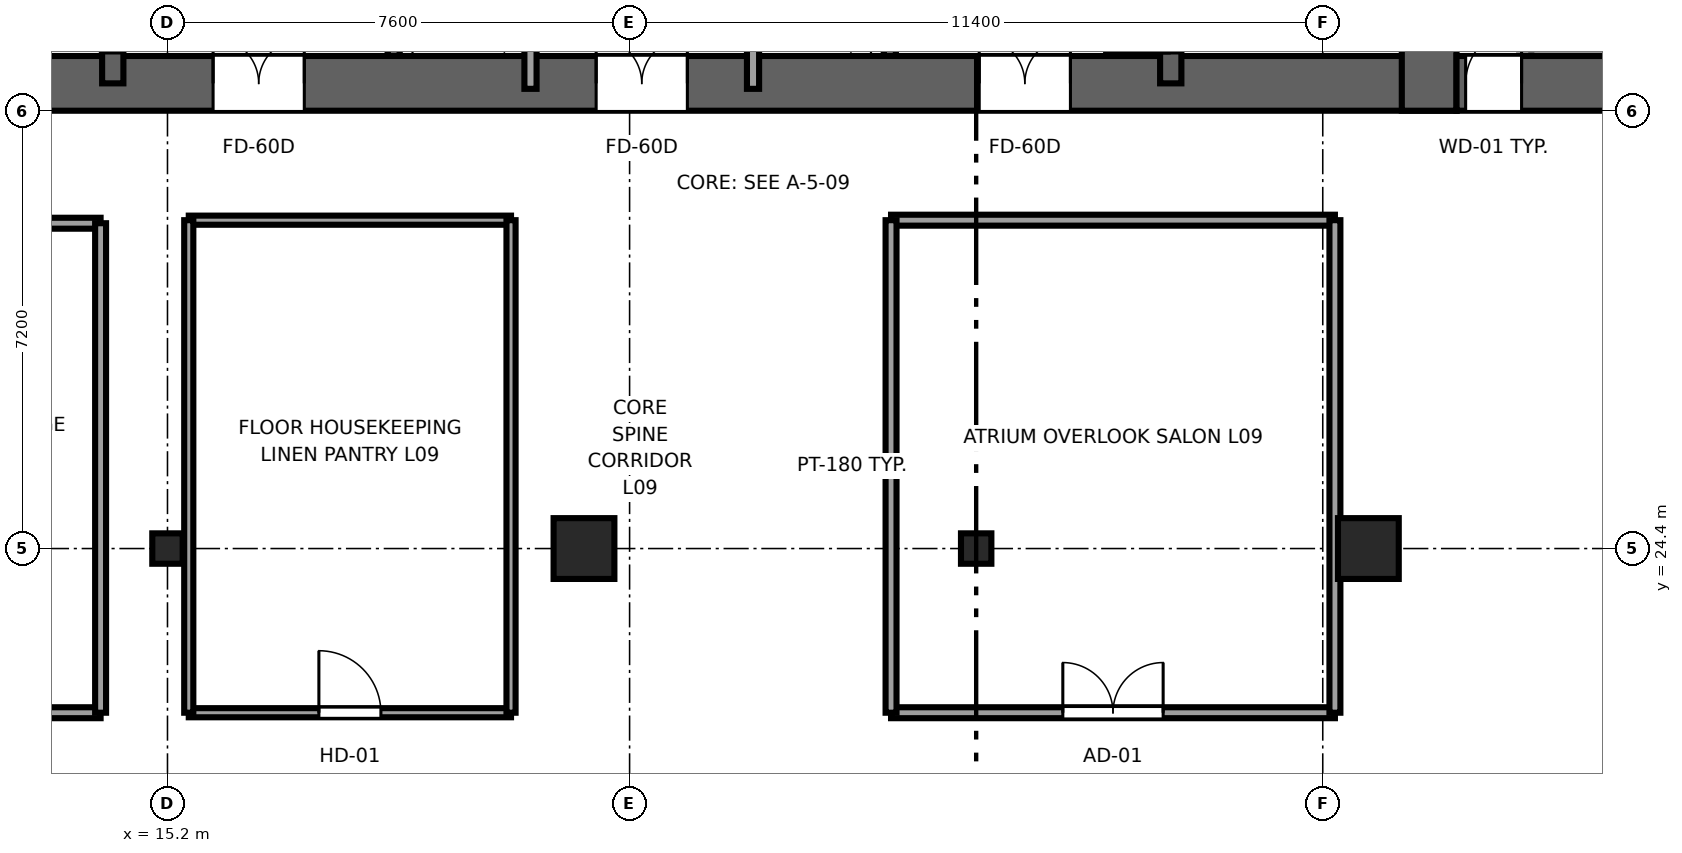
"""IFC4 building model, lengths in metres.
Left out: names, types, materials, properties, quantities, classifications, styles, units other than length and angle.
Written with IfcOpenShell. Run it as: python <this file> out.ifc"""

import sys

from ifc_helpers import new_model, si_unit, direction, frame, frame_2d, origin, origin_2d, place, context, subcontext, project, spatial, rectangle, i_section, extrude, source, transform, mapped, element, fill, save


model = new_model("IFC4")
c1 = context("Model", 3, precision=1e-05, world=origin(), true_north=direction((0.0, 1.0)))
c2 = subcontext(c1, "Body", "Model", "MODEL_VIEW")
j1 = project(units=[si_unit("LENGTHUNIT", "METRE"), si_unit("PLANEANGLEUNIT", "RADIAN")], contexts=[c1])
p1 = place(None, origin())
s1 = spatial("IfcSite", under=j1, at=p1, CompositionType="ELEMENT")
p2 = place(p1, origin())
s2 = spatial("IfcBuilding", under=s1, at=p2, CompositionType="ELEMENT")
p3 = place(p2, frame((0.0, 0.0, 42.65)))
s3 = spatial("IfcBuildingStorey", under=s2, at=p3, CompositionType="ELEMENT", Elevation=42.65)
p4 = place(p3, frame((9.6, 32.05, 0.0), z_axis=(0.0, 0.0, 1.0), x_axis=(1.0, 0.0, 0.0)))
e1 = element("IfcWall", 1, at=p4, inside=s3, PredefinedType="SHEAR", context=c2, shape_type="SweptSolid", body=[
    extrude(rectangle(XDim=26.8, YDim=0.9, at=frame_2d((13.4, 0.0))), origin(), (0.0, 0.0, 1.0), 3.55),
])
p5 = place(p4, frame((7.85, 0.0, 0.0), z_axis=(0.0, 0.0, 1.0), x_axis=(-1.0, 0.0, 0.0)))
e2 = element("IfcOpeningElement", 2, at=p5, cuts=e1, PredefinedType="OPENING", context=c2, shape_type="SweptSolid", body=[
    extrude(rectangle(XDim=1.5, YDim=2.04, at=frame_2d((0.75, 1.02))), frame((0.0, 0.46, 0.0), z_axis=(0.0, -1.0, 0.0), x_axis=(1.0, 0.0, 0.0)), (0.0, 0.0, 1.0), 0.92),
])
p6 = place(p4, frame((14.15, 0.0, 0.0), z_axis=(0.0, 0.0, 1.0), x_axis=(-1.0, 0.0, 0.0)))
e3 = element("IfcOpeningElement", 3, at=p6, cuts=e1, PredefinedType="OPENING", context=c2, shape_type="SweptSolid", body=[
    extrude(rectangle(XDim=1.5, YDim=2.04, at=frame_2d((0.75, 1.02))), frame((0.0, 0.46, 0.0), z_axis=(0.0, -1.0, 0.0), x_axis=(1.0, 0.0, 0.0)), (0.0, 0.0, 1.0), 0.92),
])
p7 = place(p4, frame((20.45, 0.0, 0.0), z_axis=(0.0, 0.0, 1.0), x_axis=(-1.0, 0.0, 0.0)))
e4 = element("IfcOpeningElement", 4, at=p7, cuts=e1, PredefinedType="OPENING", context=c2, shape_type="SweptSolid", body=[
    extrude(rectangle(XDim=1.5, YDim=2.04, at=frame_2d((0.75, 1.02))), frame((0.0, 0.46, 0.0), z_axis=(0.0, -1.0, 0.0), x_axis=(1.0, 0.0, 0.0)), (0.0, 0.0, 1.0), 0.92),
])
p8 = place(p3, frame((35.95, 31.6, 0.0), z_axis=(0.0, 0.0, 1.0), x_axis=(0.0, 1.0, 0.0)))
e5 = element("IfcWall", 5, at=p8, inside=s3, PredefinedType="SHEAR", context=c2, shape_type="SweptSolid", body=[
    extrude(rectangle(XDim=13.6, YDim=0.9, at=frame_2d((6.8, 0.0))), origin(), (0.0, 0.0, 1.0), 3.55),
])
p9 = place(p3, frame((14.3, 32.05, 0.0), z_axis=(0.0, 0.0, 1.0), x_axis=(0.0, 1.0, 0.0)))
e6 = element("IfcWall", 6, at=p9, inside=s3, PredefinedType="SHEAR", context=c2, shape_type="SweptSolid", body=[
    extrude(rectangle(XDim=12.7, YDim=0.35, at=frame_2d((6.35, 0.0))), origin(), (0.0, 0.0, 1.0), 3.55),
])
p10 = place(p9, frame((0.5, 0.0, 0.0)))
e7 = element("IfcOpeningElement", 7, at=p10, cuts=e6, PredefinedType="OPENING", context=c2, shape_type="SweptSolid", body=[
    extrude(rectangle(XDim=1.1, YDim=2.12, at=frame_2d((0.55, 1.06))), frame((0.0, 0.185, 0.0), z_axis=(0.0, -1.0, 0.0), x_axis=(1.0, 0.0, 0.0)), (0.0, 0.0, 1.0), 0.37),
])
p11 = place(p3, frame((31.7, 32.05, 0.0), z_axis=(0.0, 0.0, 1.0), x_axis=(0.0, 1.0, 0.0)))
e8 = element("IfcWall", 8, at=p11, inside=s3, PredefinedType="SHEAR", context=c2, shape_type="SweptSolid", body=[
    extrude(rectangle(XDim=12.7, YDim=0.35, at=frame_2d((6.35, 0.0))), origin(), (0.0, 0.0, 1.0), 3.55),
])
p12 = place(p11, frame((1.6, 0.0, 0.0), z_axis=(0.0, 0.0, 1.0), x_axis=(-1.0, 0.0, 0.0)))
e9 = element("IfcOpeningElement", 9, at=p12, cuts=e8, PredefinedType="OPENING", context=c2, shape_type="SweptSolid", body=[
    extrude(rectangle(XDim=1.1, YDim=2.12, at=frame_2d((0.55, 1.06))), frame((0.0, 0.185, 0.0), z_axis=(0.0, -1.0, 0.0), x_axis=(1.0, 0.0, 0.0)), (0.0, 0.0, 1.0), 0.37),
])
p13 = place(p3, frame((36.4, 32.05, 0.0), z_axis=(0.0, 0.0, 1.0), x_axis=(1.0, 0.0, 0.0)))
e10 = element("IfcWall", 10, at=p13, inside=s3, PredefinedType="SHEAR", context=c2, shape_type="SweptSolid", body=[
    extrude(rectangle(XDim=4.0, YDim=0.9, at=frame_2d((2.0, 0.0))), origin(), (0.0, 0.0, 1.0), 3.55),
])
p14 = place(p13, frame((1.07, 0.0, 0.0), z_axis=(0.0, 0.0, 1.0), x_axis=(-1.0, 0.0, 0.0)))
e11 = element("IfcOpeningElement", 11, at=p14, cuts=e10, PredefinedType="OPENING", context=c2, shape_type="SweptSolid", body=[
    extrude(rectangle(XDim=0.92, YDim=2.01, at=frame_2d((0.46, 1.005))), frame((0.0, 0.46, 0.0), z_axis=(0.0, -1.0, 0.0), x_axis=(1.0, 0.0, 0.0)), (0.0, 0.0, 1.0), 0.92),
])
m1 = source(origin(), c2, "Body", "SweptSolid", [
    extrude(i_section(OverallWidth=0.5, OverallDepth=0.5, WebThickness=0.028, FlangeThickness=0.045, at=origin_2d()), origin(), (0.0, 0.0, 1.0), 3.55),
])
p15 = place(p3, frame((15.2, 24.4, 0.0), z_axis=(0.0, 0.0, 1.0), x_axis=(1.0, 0.0, 0.0)))
e12 = element("IfcColumn", 12, at=p15, inside=s3, PredefinedType="COLUMN", context=c2, shape_type="MappedRepresentation", body=[
    mapped(m1, transform((0.0, 0.0, 0.0), x_axis=(1.0, 0.0, 0.0), y_axis=(0.0, 1.0, 0.0), z_axis=(0.0, 0.0, 1.0), scale=1.0)),
])
m2 = source(origin(), c2, "Body", "SweptSolid", [
    extrude(rectangle(XDim=1.0, YDim=1.0, at=origin_2d()), origin(), (0.0, 0.0, 1.0), 3.55),
])
for number, where, z_axis, x_axis in (
    (13, (22.05, 24.4, 0.0), (0.0, 0.0, 1.0), (1.0, 0.0, 0.0)),
    (14, (34.95, 24.4, 0.0), (0.0, 0.0, 1.0), (1.0, 0.0, 0.0)),
):
    element("IfcColumn", number, at=place(p3, frame(where, z_axis=z_axis, x_axis=x_axis)), inside=s3, PredefinedType="COLUMN", context=c2, shape_type="MappedRepresentation", body=[
        mapped(m2, transform((0.0, 0.0, 0.0), x_axis=(1.0, 0.0, 0.0), y_axis=(0.0, 1.0, 0.0), z_axis=(0.0, 0.0, 1.0), scale=1.0)),
    ])
p16 = place(p3, frame((28.5, 24.4, 0.0), z_axis=(0.0, 0.0, 1.0), x_axis=(1.0, 0.0, 0.0)))
e15 = element("IfcColumn", 15, at=p16, inside=s3, PredefinedType="COLUMN", context=c2, shape_type="MappedRepresentation", body=[
    mapped(m1, transform((0.0, 0.0, 0.0), x_axis=(1.0, 0.0, 0.0), y_axis=(0.0, 1.0, 0.0), z_axis=(0.0, 0.0, 1.0), scale=1.0)),
])
for number, where, z_axis, x_axis in (
    (16, (18.92, 32.504, 0.0), (0.0, 0.0, 1.0), (0.0, 1.0, 0.0)),
    (17, (27.08, 32.504, 0.0), (0.0, 0.0, 1.0), (0.0, 1.0, 0.0)),
):
    element("IfcWall", number, at=place(p3, frame(where, z_axis=z_axis, x_axis=x_axis)), inside=s3, PredefinedType="SOLIDWALL", context=c2, shape_type="SweptSolid", body=[
        extrude(rectangle(XDim=3.646, YDim=0.2, at=frame_2d((1.823, 0.0))), origin(), (0.0, 0.0, 1.0), 3.37),
    ])
for number, where, z_axis, x_axis in (
    (18, (21.17, 31.96, 0.0), (0.0, 0.0, 1.0), (0.0, 1.0, 0.0)),
    (19, (24.83, 31.96, 0.0), (0.0, 0.0, 1.0), (0.0, 1.0, 0.0)),
):
    element("IfcWall", number, at=place(p3, frame(where, z_axis=z_axis, x_axis=x_axis)), inside=s3, PredefinedType="SOLIDWALL", context=c2, shape_type="SweptSolid", body=[
        extrude(rectangle(XDim=12.58, YDim=0.2, at=frame_2d((6.29, 0.0))), origin(), (0.0, 0.0, 1.0), 3.37),
    ])
p17 = place(p3, frame((9.88, 21.7, 0.0), z_axis=(0.0, 0.0, 1.0), x_axis=(1.0, 0.0, 0.0)))
e20 = element("IfcWall", 20, at=p17, inside=s3, PredefinedType="PARTITIONING", context=c2, shape_type="SweptSolid", body=[
    extrude(rectangle(XDim=4.22, YDim=0.18, at=frame_2d((2.11, 0.0))), origin(), (0.0, 0.0, 1.0), 3.37),
])
p18 = place(p17, frame((1.285, 0.0, 0.0)))
e21 = element("IfcOpeningElement", 21, at=p18, cuts=e20, PredefinedType="OPENING", context=c2, shape_type="SweptSolid", body=[
    extrude(rectangle(XDim=1.65, YDim=2.15, at=frame_2d((0.825, 1.075))), frame((0.0, 0.1, 0.0), z_axis=(0.0, -1.0, 0.0), x_axis=(1.0, 0.0, 0.0)), (0.0, 0.0, 1.0), 0.2),
])
p19 = place(p3, frame((9.88, 29.75, 0.0), z_axis=(0.0, 0.0, 1.0), x_axis=(1.0, 0.0, 0.0)))
e22 = element("IfcWall", 22, at=p19, inside=s3, PredefinedType="PARTITIONING", context=c2, shape_type="SweptSolid", body=[
    extrude(rectangle(XDim=4.22, YDim=0.18, at=frame_2d((2.11, 0.0))), origin(), (0.0, 0.0, 1.0), 3.37),
])
p20 = place(p3, frame((14.1, 21.7, 0.0), z_axis=(0.0, 0.0, 1.0), x_axis=(0.0, 1.0, 0.0)))
e23 = element("IfcWall", 23, at=p20, inside=s3, PredefinedType="PARTITIONING", context=c2, shape_type="SweptSolid", body=[
    extrude(rectangle(XDim=8.05, YDim=0.18, at=frame_2d((4.025, 0.0))), origin(), (0.0, 0.0, 1.0), 3.37),
])
p21 = place(p3, frame((27.1, 21.7, 0.0), z_axis=(0.0, 0.0, 1.0), x_axis=(1.0, 0.0, 0.0)))
e24 = element("IfcWall", 24, at=p21, inside=s3, PredefinedType="PARTITIONING", context=c2, shape_type="SweptSolid", body=[
    extrude(rectangle(XDim=7.3, YDim=0.18, at=frame_2d((3.65, 0.0))), origin(), (0.0, 0.0, 1.0), 3.37),
])
p22 = place(p21, frame((2.825, 0.0, 0.0)))
e25 = element("IfcOpeningElement", 25, at=p22, cuts=e24, PredefinedType="OPENING", context=c2, shape_type="SweptSolid", body=[
    extrude(rectangle(XDim=1.65, YDim=2.15, at=frame_2d((0.825, 1.075))), frame((0.0, 0.1, 0.0), z_axis=(0.0, -1.0, 0.0), x_axis=(1.0, 0.0, 0.0)), (0.0, 0.0, 1.0), 0.2),
])
p23 = place(p3, frame((27.1, 29.8, 0.0), z_axis=(0.0, 0.0, 1.0), x_axis=(1.0, 0.0, 0.0)))
e26 = element("IfcWall", 26, at=p23, inside=s3, PredefinedType="PARTITIONING", context=c2, shape_type="SweptSolid", body=[
    extrude(rectangle(XDim=7.3, YDim=0.18, at=frame_2d((3.65, 0.0))), origin(), (0.0, 0.0, 1.0), 3.37),
])
for number, where, z_axis, x_axis in (
    (27, (27.1, 21.7, 0.0), (0.0, 0.0, 1.0), (0.0, 1.0, 0.0)),
    (28, (34.4, 21.7, 0.0), (0.0, 0.0, 1.0), (0.0, 1.0, 0.0)),
):
    element("IfcWall", number, at=place(p3, frame(where, z_axis=z_axis, x_axis=x_axis)), inside=s3, PredefinedType="PARTITIONING", context=c2, shape_type="SweptSolid", body=[
        extrude(rectangle(XDim=8.1, YDim=0.18, at=frame_2d((4.05, 0.0))), origin(), (0.0, 0.0, 1.0), 3.37),
    ])
p24 = place(p3, frame((15.55, 21.7, 0.0), z_axis=(0.0, 0.0, 1.0), x_axis=(1.0, 0.0, 0.0)))
e29 = element("IfcWall", 29, at=p24, inside=s3, PredefinedType="PARTITIONING", context=c2, shape_type="SweptSolid", body=[
    extrude(rectangle(XDim=5.3, YDim=0.15, at=frame_2d((2.65, 0.0))), origin(), (0.0, 0.0, 1.0), 3.37),
])
p25 = place(p24, frame((2.14, 0.0, 0.0)))
e30 = element("IfcOpeningElement", 30, at=p25, cuts=e29, PredefinedType="OPENING", context=c2, shape_type="SweptSolid", body=[
    extrude(rectangle(XDim=1.02, YDim=2.03, at=frame_2d((0.51, 1.015))), frame((0.0, 0.085, 0.0), z_axis=(0.0, -1.0, 0.0), x_axis=(1.0, 0.0, 0.0)), (0.0, 0.0, 1.0), 0.17),
])
p26 = place(p3, frame((15.55, 29.8, 0.0), z_axis=(0.0, 0.0, 1.0), x_axis=(1.0, 0.0, 0.0)))
e31 = element("IfcWall", 31, at=p26, inside=s3, PredefinedType="PARTITIONING", context=c2, shape_type="SweptSolid", body=[
    extrude(rectangle(XDim=5.3, YDim=0.15, at=frame_2d((2.65, 0.0))), origin(), (0.0, 0.0, 1.0), 3.37),
])
for number, where, z_axis, x_axis in (
    (32, (15.55, 21.7, 0.0), (0.0, 0.0, 1.0), (0.0, 1.0, 0.0)),
    (33, (20.85, 21.7, 0.0), (0.0, 0.0, 1.0), (0.0, 1.0, 0.0)),
):
    element("IfcWall", number, at=place(p3, frame(where, z_axis=z_axis, x_axis=x_axis)), inside=s3, PredefinedType="PARTITIONING", context=c2, shape_type="SweptSolid", body=[
        extrude(rectangle(XDim=8.1, YDim=0.15, at=frame_2d((4.05, 0.0))), origin(), (0.0, 0.0, 1.0), 3.37),
    ])
m3 = source(origin(), c2, "Body", "SweptSolid", [
    extrude(rectangle(XDim=1.1, YDim=2.12, at=frame_2d((0.55, 1.06))), frame((0.0, 0.025, 0.0), z_axis=(0.0, -1.0, 0.0), x_axis=(1.0, 0.0, 0.0)), (0.0, 0.0, 1.0), 0.05),
])
p27 = place(p10, origin())
e34 = element("IfcDoor", 34, at=p27, inside=s3, OperationType="SINGLE_SWING_RIGHT", PredefinedType="DOOR", context=c2, shape_type="MappedRepresentation", body=[
    mapped(m3, transform((0.0, 0.0, 0.0), x_axis=(1.0, 0.0, 0.0), y_axis=(0.0, 1.0, 0.0), z_axis=(0.0, 0.0, 1.0), scale=1.0)),
])
fill(e7, e34)
p28 = place(p12, origin())
e35 = element("IfcDoor", 35, at=p28, inside=s3, OperationType="SINGLE_SWING_LEFT", PredefinedType="DOOR", context=c2, shape_type="MappedRepresentation", body=[
    mapped(m3, transform((0.0, 0.0, 0.0), x_axis=(1.0, 0.0, 0.0), y_axis=(0.0, 1.0, 0.0), z_axis=(0.0, 0.0, 1.0), scale=1.0)),
])
fill(e9, e35)
m4 = source(origin(), c2, "Body", "SweptSolid", [
    extrude(rectangle(XDim=1.5, YDim=2.04, at=frame_2d((0.75, 1.02))), frame((0.0, 0.025, 0.0), z_axis=(0.0, -1.0, 0.0), x_axis=(1.0, 0.0, 0.0)), (0.0, 0.0, 1.0), 0.05),
])
p29 = place(p5, origin())
e36 = element("IfcDoor", 36, at=p29, inside=s3, OperationType="DOUBLE_DOOR_SINGLE_SWING", PredefinedType="DOOR", context=c2, shape_type="MappedRepresentation", body=[
    mapped(m4, transform((0.0, 0.0, 0.0), x_axis=(1.0, 0.0, 0.0), y_axis=(0.0, 1.0, 0.0), z_axis=(0.0, 0.0, 1.0), scale=1.0)),
])
fill(e2, e36)
p30 = place(p6, origin())
e37 = element("IfcDoor", 37, at=p30, inside=s3, OperationType="DOUBLE_DOOR_SINGLE_SWING", PredefinedType="DOOR", context=c2, shape_type="MappedRepresentation", body=[
    mapped(m4, transform((0.0, 0.0, 0.0), x_axis=(1.0, 0.0, 0.0), y_axis=(0.0, 1.0, 0.0), z_axis=(0.0, 0.0, 1.0), scale=1.0)),
])
fill(e3, e37)
p31 = place(p7, origin())
e38 = element("IfcDoor", 38, at=p31, inside=s3, OperationType="DOUBLE_DOOR_SINGLE_SWING", PredefinedType="DOOR", context=c2, shape_type="MappedRepresentation", body=[
    mapped(m4, transform((0.0, 0.0, 0.0), x_axis=(1.0, 0.0, 0.0), y_axis=(0.0, 1.0, 0.0), z_axis=(0.0, 0.0, 1.0), scale=1.0)),
])
fill(e4, e38)
m5 = source(origin(), c2, "Body", "SweptSolid", [
    extrude(rectangle(XDim=0.92, YDim=2.01, at=frame_2d((0.46, 1.005))), frame((0.0, 0.025, 0.0), z_axis=(0.0, -1.0, 0.0), x_axis=(1.0, 0.0, 0.0)), (0.0, 0.0, 1.0), 0.05),
])
p32 = place(p14, origin())
e39 = element("IfcDoor", 39, at=p32, inside=s3, OperationType="SINGLE_SWING_RIGHT", PredefinedType="DOOR", context=c2, shape_type="MappedRepresentation", body=[
    mapped(m5, transform((0.0, 0.0, 0.0), x_axis=(1.0, 0.0, 0.0), y_axis=(0.0, 1.0, 0.0), z_axis=(0.0, 0.0, 1.0), scale=1.0)),
])
fill(e11, e39)
m6 = source(origin(), c2, "Body", "SweptSolid", [
    extrude(rectangle(XDim=1.65, YDim=2.15, at=frame_2d((0.825, 1.075))), frame((0.0, 0.025, 0.0), z_axis=(0.0, -1.0, 0.0), x_axis=(1.0, 0.0, 0.0)), (0.0, 0.0, 1.0), 0.05),
])
p33 = place(p22, origin())
e40 = element("IfcDoor", 40, at=p33, inside=s3, OperationType="DOUBLE_DOOR_SINGLE_SWING", PredefinedType="DOOR", context=c2, shape_type="MappedRepresentation", body=[
    mapped(m6, transform((0.0, 0.0, 0.0), x_axis=(1.0, 0.0, 0.0), y_axis=(0.0, 1.0, 0.0), z_axis=(0.0, 0.0, 1.0), scale=1.0)),
])
fill(e25, e40)
m7 = source(origin(), c2, "Body", "SweptSolid", [
    extrude(rectangle(XDim=1.02, YDim=2.03, at=frame_2d((0.51, 1.015))), frame((0.0, 0.025, 0.0), z_axis=(0.0, -1.0, 0.0), x_axis=(1.0, 0.0, 0.0)), (0.0, 0.0, 1.0), 0.05),
])
p34 = place(p25, origin())
e41 = element("IfcDoor", 41, at=p34, inside=s3, OperationType="SINGLE_SWING_LEFT", PredefinedType="DOOR", context=c2, shape_type="MappedRepresentation", body=[
    mapped(m7, transform((0.0, 0.0, 0.0), x_axis=(1.0, 0.0, 0.0), y_axis=(0.0, 1.0, 0.0), z_axis=(0.0, 0.0, 1.0), scale=1.0)),
])
fill(e30, e41)
save(model, sys.argv[1])
